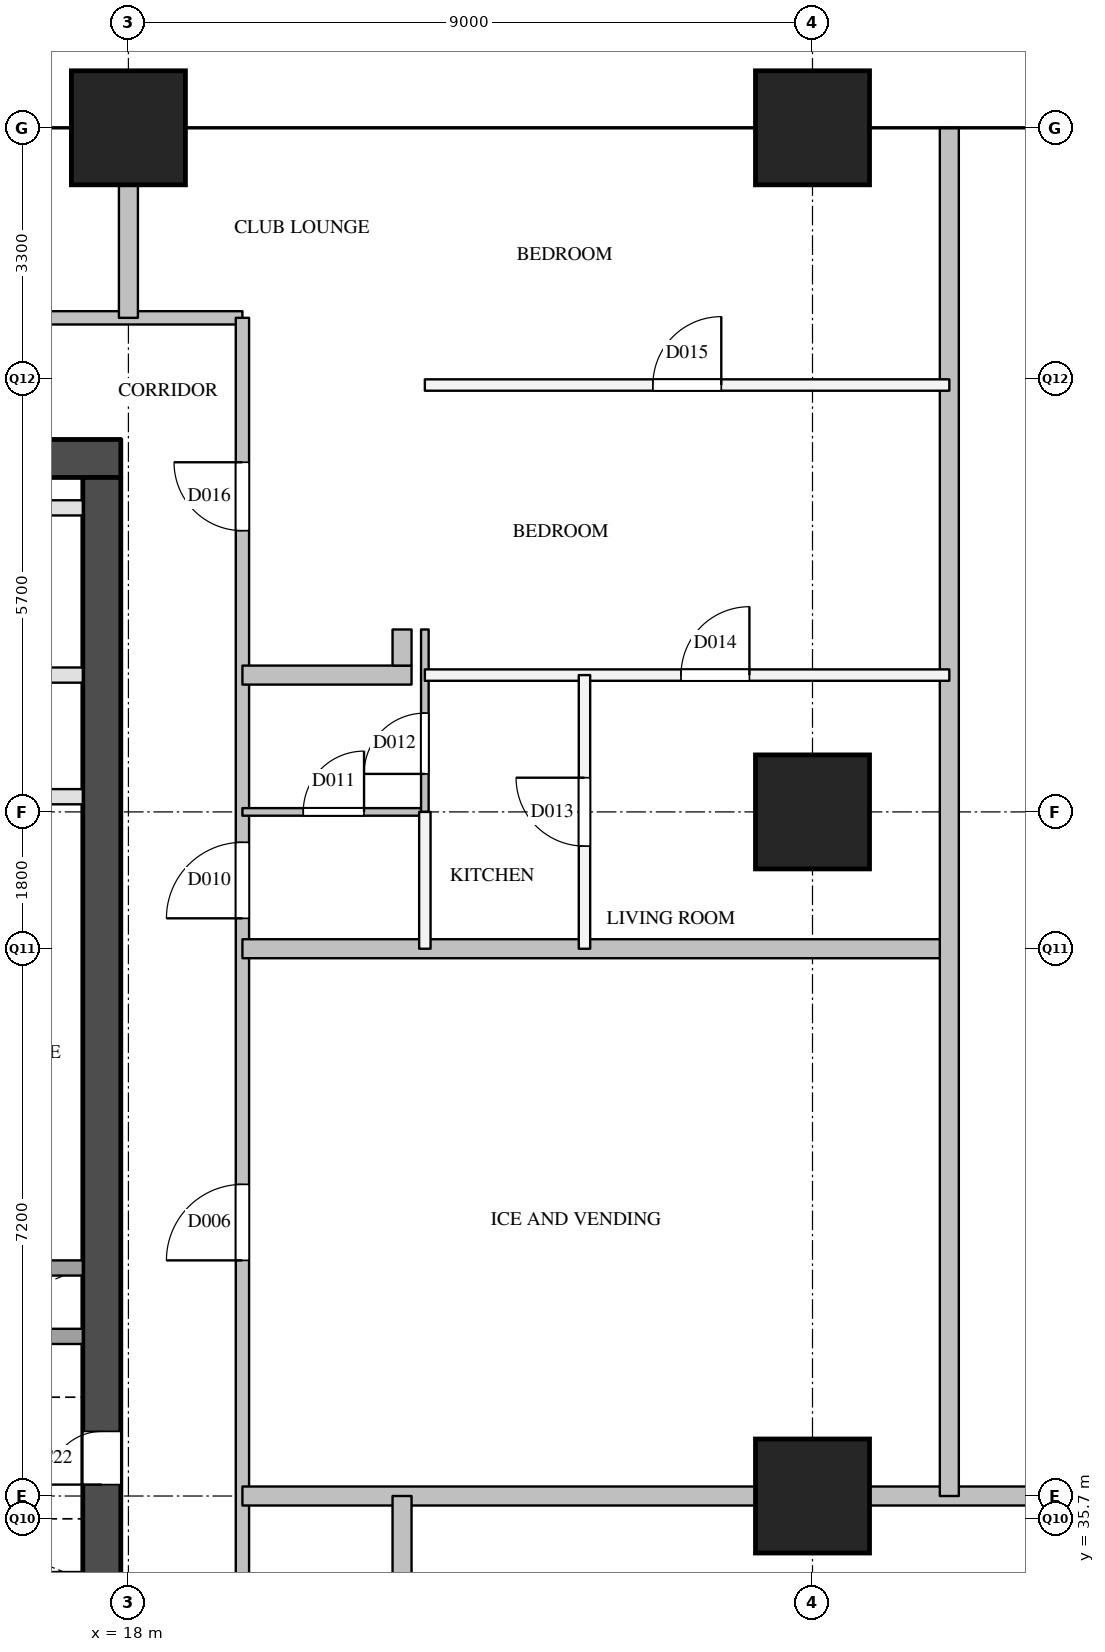
"""IFC4 building model, lengths in metres.
Left out: names, types, materials, properties, quantities, classifications, styles, units other than length and angle.
Written with IfcOpenShell. Run it as: python <this file> out.ifc"""

import sys

from ifc_helpers import new_model, si_unit, direction, frame, frame_2d, origin, origin_2d, place, context, subcontext, project, spatial, rectangle, extrude, element, fill, save


model = new_model("IFC4")
c1 = context("Model", 3, precision=1e-05, world=origin(), true_north=direction((0.0, 1.0)))
c2 = subcontext(c1, "Body", "Model", "MODEL_VIEW")
j1 = project(units=[si_unit("LENGTHUNIT", "METRE"), si_unit("PLANEANGLEUNIT", "RADIAN")], contexts=[c1])
p1 = place(None, origin())
s1 = spatial("IfcSite", under=j1, at=p1, CompositionType="ELEMENT")
p2 = place(p1, origin())
s2 = spatial("IfcBuilding", under=s1, at=p2, CompositionType="ELEMENT")
p3 = place(p2, frame((0.0, 0.0, 166.1)))
s3 = spatial("IfcBuildingStorey", under=s2, at=p3, CompositionType="ELEMENT", Elevation=166.1)
for number, where, z_axis, x_axis in (
    (1, (18.0, 54.0, 0.0), (0.0, 0.0, 1.0), (1.0, 0.0, 0.0)),
    (2, (27.0, 36.0, 0.0), (0.0, 0.0, 1.0), (1.0, 0.0, 0.0)),
    (3, (27.0, 45.0, 0.0), (0.0, 0.0, 1.0), (1.0, 0.0, 0.0)),
    (4, (27.0, 54.0, 0.0), (0.0, 0.0, 1.0), (1.0, 0.0, 0.0)),
):
    element("IfcColumn", number, at=place(p3, frame(where, z_axis=z_axis, x_axis=x_axis)), inside=s3, PredefinedType="COLUMN", context=c2, shape_type="SweptSolid", body=[
        extrude(rectangle(XDim=1.5, YDim=1.5, at=origin_2d()), origin(), (0.0, 0.0, 1.0), 3.9),
    ])
p4 = place(p3, frame((5.7, 49.65, 0.0), z_axis=(0.0, 0.0, 1.0), x_axis=(1.0, 0.0, 0.0)))
e5 = element("IfcWall", 5, at=p4, inside=s3, PredefinedType="SHEAR", context=c2, shape_type="SweptSolid", body=[
    extrude(rectangle(XDim=12.2, YDim=0.5, at=frame_2d((6.1, 0.0))), origin(), (0.0, 0.0, 1.0), 3.6),
])
p5 = place(p3, frame((17.65, 29.1, 0.0), z_axis=(0.0, 0.0, 1.0), x_axis=(0.0, 1.0, 0.0)))
e6 = element("IfcWall", 6, at=p5, inside=s3, PredefinedType="SHEAR", context=c2, shape_type="SweptSolid", body=[
    extrude(rectangle(XDim=20.3, YDim=0.5, at=frame_2d((10.15, 0.0))), origin(), (0.0, 0.0, 1.0), 3.6),
])
p6 = place(p5, frame((1.25, 0.0, 0.0)))
e7 = element("IfcOpeningElement", 7, at=p6, cuts=e6, PredefinedType="OPENING", context=c2, shape_type="SweptSolid", body=[
    extrude(rectangle(XDim=0.7, YDim=2.1, at=frame_2d((0.35, 1.05))), frame((0.0, 0.26, 0.0), z_axis=(0.0, -1.0, 0.0), x_axis=(1.0, 0.0, 0.0)), (0.0, 0.0, 1.0), 0.52),
])
p7 = place(p5, frame((7.05, 0.0, 0.0)))
e8 = element("IfcOpeningElement", 8, at=p7, cuts=e6, PredefinedType="OPENING", context=c2, shape_type="SweptSolid", body=[
    extrude(rectangle(XDim=0.7, YDim=2.1, at=frame_2d((0.35, 1.05))), frame((0.0, 0.26, 0.0), z_axis=(0.0, -1.0, 0.0), x_axis=(1.0, 0.0, 0.0)), (0.0, 0.0, 1.0), 0.52),
])
p8 = place(p5, frame((3.6, 0.0, 0.0)))
e9 = element("IfcOpeningElement", 9, at=p8, cuts=e6, PredefinedType="OPENING", context=c2, shape_type="SweptSolid", body=[
    extrude(rectangle(XDim=1.8, YDim=2.1, at=frame_2d((0.9, 1.05))), frame((0.0, 0.26, 0.0), z_axis=(0.0, -1.0, 0.0), x_axis=(1.0, 0.0, 0.0)), (0.0, 0.0, 1.0), 0.52),
])
p9 = place(p3, frame((6.2, 38.1, 0.0), z_axis=(0.0, 0.0, 1.0), x_axis=(1.0, 0.0, 0.0)))
e10 = element("IfcWall", 10, at=p9, inside=s3, PredefinedType="SOLIDWALL", context=c2, shape_type="SweptSolid", body=[
    extrude(rectangle(XDim=11.2, YDim=0.2, at=frame_2d((5.6, 0.0))), origin(), (0.0, 0.0, 1.0), 3.6),
])
p10 = place(p9, frame((8.85, 0.0, 0.0)))
e11 = element("IfcOpeningElement", 11, at=p10, cuts=e10, PredefinedType="OPENING", context=c2, shape_type="SweptSolid", body=[
    extrude(rectangle(XDim=1.2, YDim=2.1, at=frame_2d((0.6, 1.05))), frame((0.0, 0.11, 0.0), z_axis=(0.0, -1.0, 0.0), x_axis=(1.0, 0.0, 0.0)), (0.0, 0.0, 1.0), 0.22),
])
p11 = place(p3, frame((12.5, 39.0, 0.0), z_axis=(0.0, 0.0, 1.0), x_axis=(1.0, 0.0, 0.0)))
e12 = element("IfcWall", 12, at=p11, inside=s3, PredefinedType="SOLIDWALL", context=c2, shape_type="SweptSolid", body=[
    extrude(rectangle(XDim=4.9, YDim=0.2, at=frame_2d((2.45, 0.0))), origin(), (0.0, 0.0, 1.0), 3.6),
])
p12 = place(p3, frame((12.5, 45.2, 0.0), z_axis=(0.0, 0.0, 1.0), x_axis=(1.0, 0.0, 0.0)))
e13 = element("IfcWall", 13, at=p12, inside=s3, PredefinedType="PARTITIONING", context=c2, shape_type="SweptSolid", body=[
    extrude(rectangle(XDim=4.9, YDim=0.2, at=frame_2d((2.45, 0.0))), origin(), (0.0, 0.0, 1.0), 3.6),
])
p13 = place(p12, frame((0.653, 0.0, 0.0)))
e14 = element("IfcOpeningElement", 14, at=p13, cuts=e13, PredefinedType="OPENING", context=c2, shape_type="SweptSolid", body=[
    extrude(rectangle(XDim=0.9, YDim=2.1, at=frame_2d((0.45, 1.05))), frame((0.0, 0.11, 0.0), z_axis=(0.0, -1.0, 0.0), x_axis=(1.0, 0.0, 0.0)), (0.0, 0.0, 1.0), 0.22),
])
p14 = place(p12, frame((3.103, 0.0, 0.0)))
e15 = element("IfcOpeningElement", 15, at=p14, cuts=e13, PredefinedType="OPENING", context=c2, shape_type="SweptSolid", body=[
    extrude(rectangle(XDim=0.9, YDim=2.1, at=frame_2d((0.45, 1.05))), frame((0.0, 0.11, 0.0), z_axis=(0.0, -1.0, 0.0), x_axis=(1.0, 0.0, 0.0)), (0.0, 0.0, 1.0), 0.22),
])
p15 = place(p3, frame((6.2, 46.8, 0.0), z_axis=(0.0, 0.0, 1.0), x_axis=(1.0, 0.0, 0.0)))
e16 = element("IfcWall", 16, at=p15, inside=s3, PredefinedType="PARTITIONING", context=c2, shape_type="SweptSolid", body=[
    extrude(rectangle(XDim=11.2, YDim=0.2, at=frame_2d((5.6, 0.0))), origin(), (0.0, 0.0, 1.0), 3.6),
])
p16 = place(p15, frame((0.67, 0.0, 0.0)))
e17 = element("IfcOpeningElement", 17, at=p16, cuts=e16, PredefinedType="OPENING", context=c2, shape_type="SweptSolid", body=[
    extrude(rectangle(XDim=0.9, YDim=2.1, at=frame_2d((0.45, 1.05))), frame((0.0, 0.11, 0.0), z_axis=(0.0, -1.0, 0.0), x_axis=(1.0, 0.0, 0.0)), (0.0, 0.0, 1.0), 0.22),
])
p17 = place(p15, frame((6.27, 0.0, 0.0)))
e18 = element("IfcOpeningElement", 18, at=p17, cuts=e16, PredefinedType="OPENING", context=c2, shape_type="SweptSolid", body=[
    extrude(rectangle(XDim=0.9, YDim=2.1, at=frame_2d((0.45, 1.05))), frame((0.0, 0.11, 0.0), z_axis=(0.0, -1.0, 0.0), x_axis=(1.0, 0.0, 0.0)), (0.0, 0.0, 1.0), 0.22),
])
p18 = place(p3, frame((6.2, 49.0, 0.0), z_axis=(0.0, 0.0, 1.0), x_axis=(1.0, 0.0, 0.0)))
e19 = element("IfcWall", 19, at=p18, inside=s3, PredefinedType="PARTITIONING", context=c2, shape_type="SweptSolid", body=[
    extrude(rectangle(XDim=11.2, YDim=0.2, at=frame_2d((5.6, 0.0))), origin(), (0.0, 0.0, 1.0), 3.6),
])
p19 = place(p3, frame((4.1, 51.5, 0.0), z_axis=(0.0, 0.0, 1.0), x_axis=(1.0, 0.0, 0.0)))
e20 = element("IfcWall", 20, at=p19, inside=s3, PredefinedType="PARTITIONING", context=c2, shape_type="SweptSolid", body=[
    extrude(rectangle(XDim=15.4, YDim=0.175, at=frame_2d((7.7, 0.0))), origin(), (0.0, 0.0, 1.0), 3.6),
])
p20 = place(p19, frame((6.5, 0.0, 0.0)))
e21 = element("IfcOpeningElement", 21, at=p20, cuts=e20, PredefinedType="OPENING", context=c2, shape_type="SweptSolid", body=[
    extrude(rectangle(XDim=0.9, YDim=2.1, at=frame_2d((0.45, 1.05))), frame((0.0, 0.097, 0.0), z_axis=(0.0, -1.0, 0.0), x_axis=(1.0, 0.0, 0.0)), (0.0, 0.0, 1.0), 0.195),
])
p21 = place(p3, frame((19.5, 28.5, 0.0), z_axis=(0.0, 0.0, 1.0), x_axis=(0.0, 1.0, 0.0)))
e22 = element("IfcWall", 22, at=p21, inside=s3, PredefinedType="PARTITIONING", context=c2, shape_type="SweptSolid", body=[
    extrude(rectangle(XDim=23.0, YDim=0.175, at=frame_2d((11.5, 0.0))), origin(), (0.0, 0.0, 1.0), 3.6),
])
p22 = place(p21, frame((3.25, 0.0, 0.0)))
e23 = element("IfcOpeningElement", 23, at=p22, cuts=e22, PredefinedType="OPENING", context=c2, shape_type="SweptSolid", body=[
    extrude(rectangle(XDim=1.0, YDim=2.1, at=frame_2d((0.5, 1.05))), frame((0.0, 0.097, 0.0), z_axis=(0.0, -1.0, 0.0), x_axis=(1.0, 0.0, 0.0)), (0.0, 0.0, 1.0), 0.195),
])
p23 = place(p21, frame((10.6, 0.0, 0.0)))
e24 = element("IfcOpeningElement", 24, at=p23, cuts=e22, PredefinedType="OPENING", context=c2, shape_type="SweptSolid", body=[
    extrude(rectangle(XDim=1.0, YDim=2.1, at=frame_2d((0.5, 1.05))), frame((0.0, 0.097, 0.0), z_axis=(0.0, -1.0, 0.0), x_axis=(1.0, 0.0, 0.0)), (0.0, 0.0, 1.0), 0.195),
])
p24 = place(p21, frame((15.1, 0.0, 0.0)))
e25 = element("IfcOpeningElement", 25, at=p24, cuts=e22, PredefinedType="OPENING", context=c2, shape_type="SweptSolid", body=[
    extrude(rectangle(XDim=1.0, YDim=2.1, at=frame_2d((0.5, 1.05))), frame((0.0, 0.097, 0.0), z_axis=(0.0, -1.0, 0.0), x_axis=(1.0, 0.0, 0.0)), (0.0, 0.0, 1.0), 0.195),
])
p25 = place(p21, frame((20.2, 0.0, 0.0)))
e26 = element("IfcOpeningElement", 26, at=p25, cuts=e22, PredefinedType="OPENING", context=c2, shape_type="SweptSolid", body=[
    extrude(rectangle(XDim=0.9, YDim=2.1, at=frame_2d((0.45, 1.05))), frame((0.0, 0.097, 0.0), z_axis=(0.0, -1.0, 0.0), x_axis=(1.0, 0.0, 0.0)), (0.0, 0.0, 1.0), 0.195),
])
p26 = place(p3, frame((21.9, 46.8, 0.0), z_axis=(0.0, 0.0, 1.0), x_axis=(1.0, 0.0, 0.0)))
e27 = element("IfcWall", 27, at=p26, inside=s3, PredefinedType="PARTITIONING", context=c2, shape_type="SweptSolid", body=[
    extrude(rectangle(XDim=6.9, YDim=0.15, at=frame_2d((3.45, 0.0))), origin(), (0.0, 0.0, 1.0), 2.6),
])
p27 = place(p26, frame((3.37, 0.0, 0.0)))
e28 = element("IfcOpeningElement", 28, at=p27, cuts=e27, PredefinedType="OPENING", context=c2, shape_type="SweptSolid", body=[
    extrude(rectangle(XDim=0.9, YDim=2.1, at=frame_2d((0.45, 1.05))), frame((0.0, 0.085, 0.0), z_axis=(0.0, -1.0, 0.0), x_axis=(1.0, 0.0, 0.0)), (0.0, 0.0, 1.0), 0.17),
])
p28 = place(p3, frame((21.9, 50.616, 0.0), z_axis=(0.0, 0.0, 1.0), x_axis=(1.0, 0.0, 0.0)))
e29 = element("IfcWall", 29, at=p28, inside=s3, PredefinedType="PARTITIONING", context=c2, shape_type="SweptSolid", body=[
    extrude(rectangle(XDim=6.9, YDim=0.15, at=frame_2d((3.45, 0.0))), origin(), (0.0, 0.0, 1.0), 2.6),
])
p29 = place(p28, frame((3.0, 0.0, 0.0)))
e30 = element("IfcOpeningElement", 30, at=p29, cuts=e29, PredefinedType="OPENING", context=c2, shape_type="SweptSolid", body=[
    extrude(rectangle(XDim=0.9, YDim=2.1, at=frame_2d((0.45, 1.05))), frame((0.0, 0.085, 0.0), z_axis=(0.0, -1.0, 0.0), x_axis=(1.0, 0.0, 0.0)), (0.0, 0.0, 1.0), 0.17),
])
p30 = place(p3, frame((21.9, 43.2, 0.0), z_axis=(0.0, 0.0, 1.0), x_axis=(0.0, 1.0, 0.0)))
e31 = element("IfcWall", 31, at=p30, inside=s3, PredefinedType="PARTITIONING", context=c2, shape_type="SweptSolid", body=[
    extrude(rectangle(XDim=1.8, YDim=0.15, at=frame_2d((0.9, 0.0))), origin(), (0.0, 0.0, 1.0), 3.6),
])
p31 = place(p3, frame((24.0, 43.2, 0.0), z_axis=(0.0, 0.0, 1.0), x_axis=(0.0, 1.0, 0.0)))
e32 = element("IfcWall", 32, at=p31, inside=s3, PredefinedType="PARTITIONING", context=c2, shape_type="SweptSolid", body=[
    extrude(rectangle(XDim=3.6, YDim=0.15, at=frame_2d((1.8, 0.0))), origin(), (0.0, 0.0, 1.0), 3.6),
])
p32 = place(p31, frame((1.35, 0.0, 0.0)))
e33 = element("IfcOpeningElement", 33, at=p32, cuts=e32, PredefinedType="OPENING", context=c2, shape_type="SweptSolid", body=[
    extrude(rectangle(XDim=0.9, YDim=2.1, at=frame_2d((0.45, 1.05))), frame((0.0, 0.085, 0.0), z_axis=(0.0, -1.0, 0.0), x_axis=(1.0, 0.0, 0.0)), (0.0, 0.0, 1.0), 0.17),
])
p33 = place(p3, frame((19.5, 36.0, 0.0), z_axis=(0.0, 0.0, 1.0), x_axis=(1.0, 0.0, 0.0)))
e34 = element("IfcWall", 34, at=p33, inside=s3, PredefinedType="PARTITIONING", context=c2, shape_type="SweptSolid", body=[
    extrude(rectangle(XDim=15.0, YDim=0.25, at=frame_2d((7.5, 0.0))), origin(), (0.0, 0.0, 1.0), 3.6),
])
p34 = place(p3, frame((19.5, 43.2, 0.0), z_axis=(0.0, 0.0, 1.0), x_axis=(1.0, 0.0, 0.0)))
e35 = element("IfcWall", 35, at=p34, inside=s3, PredefinedType="PARTITIONING", context=c2, shape_type="SweptSolid", body=[
    extrude(rectangle(XDim=9.3, YDim=0.25, at=frame_2d((4.65, 0.0))), origin(), (0.0, 0.0, 1.0), 2.6),
])
p35 = place(p3, frame((19.5, 46.8, 0.0), z_axis=(0.0, 0.0, 1.0), x_axis=(1.0, 0.0, 0.0)))
e36 = element("IfcWall", 36, at=p35, inside=s3, PredefinedType="PARTITIONING", context=c2, shape_type="SweptSolid", body=[
    extrude(rectangle(XDim=2.225, YDim=0.25, at=frame_2d((1.113, 0.0))), origin(), (0.0, 0.0, 1.0), 3.6),
])
p36 = place(p3, frame((18.0, 51.5, 0.0), z_axis=(0.0, 0.0, 1.0), x_axis=(0.0, 1.0, 0.0)))
e37 = element("IfcWall", 37, at=p36, inside=s3, PredefinedType="PARTITIONING", context=c2, shape_type="SweptSolid", body=[
    extrude(rectangle(XDim=2.5, YDim=0.25, at=frame_2d((1.25, 0.0))), origin(), (0.0, 0.0, 1.0), 3.6),
])
p37 = place(p3, frame((21.6, 27.0, 0.0), z_axis=(0.0, 0.0, 1.0), x_axis=(0.0, 1.0, 0.0)))
e38 = element("IfcWall", 38, at=p37, inside=s3, PredefinedType="PARTITIONING", context=c2, shape_type="SweptSolid", body=[
    extrude(rectangle(XDim=9.0, YDim=0.25, at=frame_2d((4.5, 0.0))), origin(), (0.0, 0.0, 1.0), 2.6),
])
p38 = place(p3, frame((21.6, 46.925, 0.0), z_axis=(0.0, 0.0, 1.0), x_axis=(0.0, 1.0, 0.0)))
e39 = element("IfcWall", 39, at=p38, inside=s3, PredefinedType="PARTITIONING", context=c2, shape_type="SweptSolid", body=[
    extrude(rectangle(XDim=0.475, YDim=0.25, at=frame_2d((0.237, 0.0))), origin(), (0.0, 0.0, 1.0), 3.6),
])
p39 = place(p3, frame((28.8, 36.0, 0.0), z_axis=(0.0, 0.0, 1.0), x_axis=(0.0, 1.0, 0.0)))
e40 = element("IfcWall", 40, at=p39, inside=s3, PredefinedType="PARTITIONING", context=c2, shape_type="SweptSolid", body=[
    extrude(rectangle(XDim=18.0, YDim=0.25, at=frame_2d((9.0, 0.0))), origin(), (0.0, 0.0, 1.0), 2.6),
])
p40 = place(p3, frame((19.5, 45.0, 0.0), z_axis=(0.0, 0.0, 1.0), x_axis=(1.0, 0.0, 0.0)))
e41 = element("IfcWall", 41, at=p40, inside=s3, PredefinedType="PARTITIONING", context=c2, shape_type="SweptSolid", body=[
    extrude(rectangle(XDim=2.4, YDim=0.1, at=frame_2d((1.2, 0.0))), origin(), (0.0, 0.0, 1.0), 3.6),
])
p41 = place(p40, frame((0.8, 0.0, 0.0)))
e42 = element("IfcOpeningElement", 42, at=p41, cuts=e41, PredefinedType="OPENING", context=c2, shape_type="SweptSolid", body=[
    extrude(rectangle(XDim=0.8, YDim=2.1, at=frame_2d((0.4, 1.05))), frame((0.0, 0.06, 0.0), z_axis=(0.0, -1.0, 0.0), x_axis=(1.0, 0.0, 0.0)), (0.0, 0.0, 1.0), 0.12),
])
p42 = place(p3, frame((21.9, 45.0, 0.0), z_axis=(0.0, 0.0, 1.0), x_axis=(0.0, 1.0, 0.0)))
e43 = element("IfcWall", 43, at=p42, inside=s3, PredefinedType="PARTITIONING", context=c2, shape_type="SweptSolid", body=[
    extrude(rectangle(XDim=2.4, YDim=0.1, at=frame_2d((1.2, 0.0))), origin(), (0.0, 0.0, 1.0), 3.6),
])
p43 = place(p42, frame((0.5, 0.0, 0.0)))
e44 = element("IfcOpeningElement", 44, at=p43, cuts=e43, PredefinedType="OPENING", context=c2, shape_type="SweptSolid", body=[
    extrude(rectangle(XDim=0.8, YDim=2.1, at=frame_2d((0.4, 1.05))), frame((0.0, 0.06, 0.0), z_axis=(0.0, -1.0, 0.0), x_axis=(1.0, 0.0, 0.0)), (0.0, 0.0, 1.0), 0.12),
])
p44 = place(p7, origin())
e45 = element("IfcDoor", 45, at=p44, inside=s3, OperationType="SINGLE_SWING_LEFT", PredefinedType="DOOR", context=c2, shape_type="SweptSolid", body=[
    extrude(rectangle(XDim=0.7, YDim=2.1, at=frame_2d((0.35, 1.05))), frame((0.0, 0.025, 0.0), z_axis=(0.0, -1.0, 0.0), x_axis=(1.0, 0.0, 0.0)), (0.0, 0.0, 1.0), 0.05),
])
fill(e8, e45)
p45 = place(p23, origin())
e46 = element("IfcDoor", 46, at=p45, inside=s3, OperationType="SINGLE_SWING_LEFT", PredefinedType="DOOR", context=c2, shape_type="SweptSolid", body=[
    extrude(rectangle(XDim=1.0, YDim=2.1, at=frame_2d((0.5, 1.05))), frame((0.0, 0.025, 0.0), z_axis=(0.0, -1.0, 0.0), x_axis=(1.0, 0.0, 0.0)), (0.0, 0.0, 1.0), 0.05),
])
fill(e24, e46)
p46 = place(p24, origin())
e47 = element("IfcDoor", 47, at=p46, inside=s3, OperationType="SINGLE_SWING_LEFT", PredefinedType="DOOR", context=c2, shape_type="SweptSolid", body=[
    extrude(rectangle(XDim=1.0, YDim=2.1, at=frame_2d((0.5, 1.05))), frame((0.0, 0.025, 0.0), z_axis=(0.0, -1.0, 0.0), x_axis=(1.0, 0.0, 0.0)), (0.0, 0.0, 1.0), 0.05),
])
fill(e25, e47)
p47 = place(p41, origin())
e48 = element("IfcDoor", 48, at=p47, inside=s3, OperationType="SINGLE_SWING_RIGHT", PredefinedType="DOOR", context=c2, shape_type="SweptSolid", body=[
    extrude(rectangle(XDim=0.8, YDim=2.1, at=frame_2d((0.4, 1.05))), frame((0.0, 0.025, 0.0), z_axis=(0.0, -1.0, 0.0), x_axis=(1.0, 0.0, 0.0)), (0.0, 0.0, 1.0), 0.05),
])
fill(e42, e48)
p48 = place(p43, origin())
e49 = element("IfcDoor", 49, at=p48, inside=s3, OperationType="SINGLE_SWING_LEFT", PredefinedType="DOOR", context=c2, shape_type="SweptSolid", body=[
    extrude(rectangle(XDim=0.8, YDim=2.1, at=frame_2d((0.4, 1.05))), frame((0.0, 0.025, 0.0), z_axis=(0.0, -1.0, 0.0), x_axis=(1.0, 0.0, 0.0)), (0.0, 0.0, 1.0), 0.05),
])
fill(e44, e49)
p49 = place(p32, origin())
e50 = element("IfcDoor", 50, at=p49, inside=s3, OperationType="SINGLE_SWING_RIGHT", PredefinedType="DOOR", context=c2, shape_type="SweptSolid", body=[
    extrude(rectangle(XDim=0.9, YDim=2.1, at=frame_2d((0.45, 1.05))), frame((0.0, 0.025, 0.0), z_axis=(0.0, -1.0, 0.0), x_axis=(1.0, 0.0, 0.0)), (0.0, 0.0, 1.0), 0.05),
])
fill(e33, e50)
p50 = place(p27, origin())
e51 = element("IfcDoor", 51, at=p50, inside=s3, OperationType="SINGLE_SWING_RIGHT", PredefinedType="DOOR", context=c2, shape_type="SweptSolid", body=[
    extrude(rectangle(XDim=0.9, YDim=2.1, at=frame_2d((0.45, 1.05))), frame((0.0, 0.025, 0.0), z_axis=(0.0, -1.0, 0.0), x_axis=(1.0, 0.0, 0.0)), (0.0, 0.0, 1.0), 0.05),
])
fill(e28, e51)
p51 = place(p29, origin())
e52 = element("IfcDoor", 52, at=p51, inside=s3, OperationType="SINGLE_SWING_RIGHT", PredefinedType="DOOR", context=c2, shape_type="SweptSolid", body=[
    extrude(rectangle(XDim=0.9, YDim=2.1, at=frame_2d((0.45, 1.05))), frame((0.0, 0.025, 0.0), z_axis=(0.0, -1.0, 0.0), x_axis=(1.0, 0.0, 0.0)), (0.0, 0.0, 1.0), 0.05),
])
fill(e30, e52)
p52 = place(p25, origin())
e53 = element("IfcDoor", 53, at=p52, inside=s3, OperationType="SINGLE_SWING_RIGHT", PredefinedType="DOOR", context=c2, shape_type="SweptSolid", body=[
    extrude(rectangle(XDim=0.9, YDim=2.1, at=frame_2d((0.45, 1.05))), frame((0.0, 0.025, 0.0), z_axis=(0.0, -1.0, 0.0), x_axis=(1.0, 0.0, 0.0)), (0.0, 0.0, 1.0), 0.05),
])
fill(e26, e53)
save(model, sys.argv[1])
